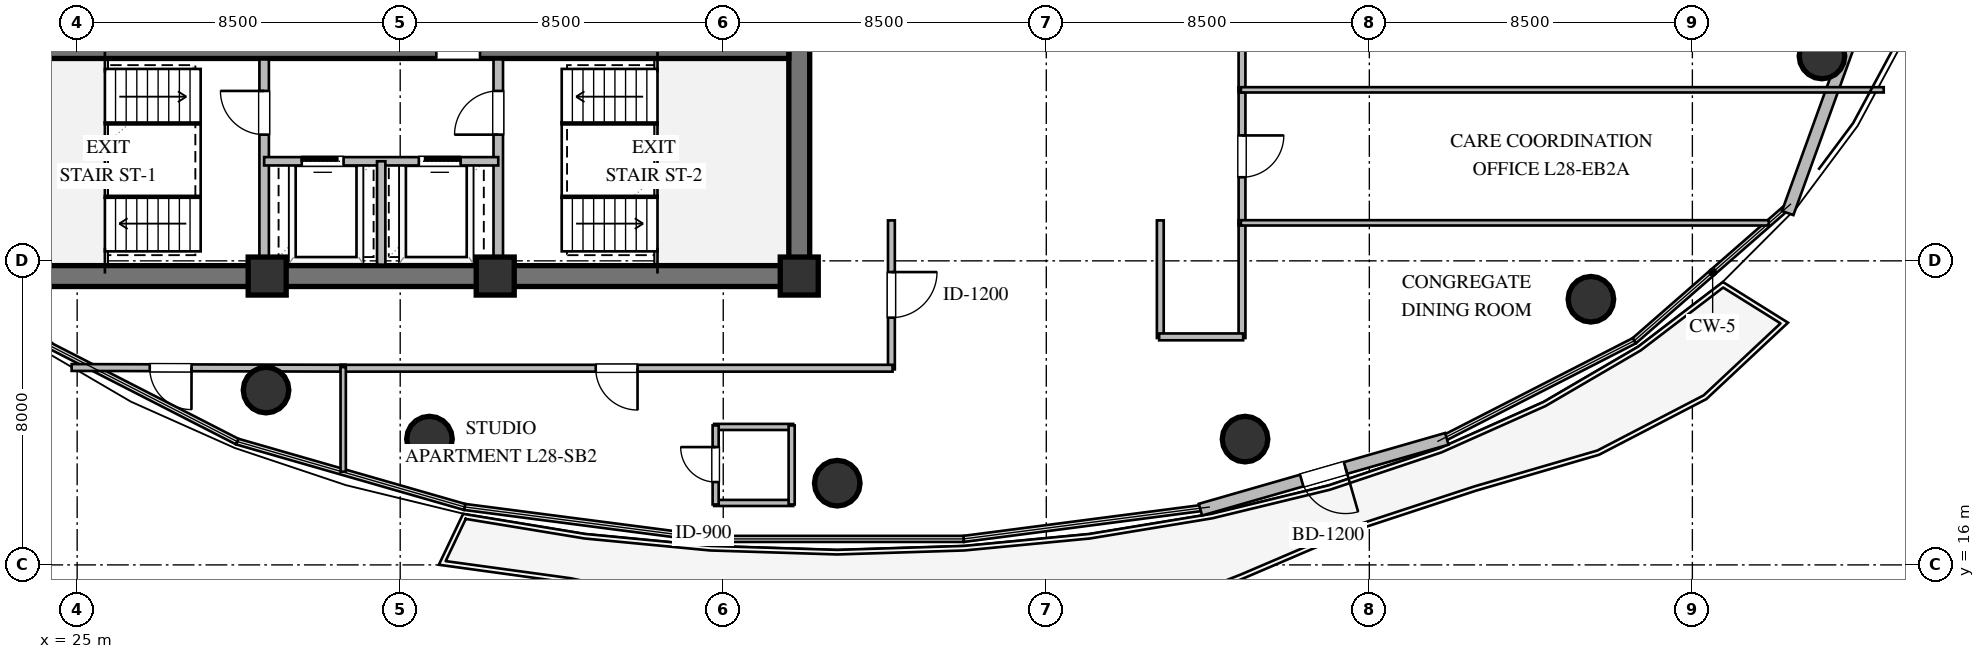
"""IFC4 building model, lengths in metres.
Left out: names, types, materials, properties, quantities, classifications, styles, units other than length and angle.
Written with IfcOpenShell. Run it as: python <this file> out.ifc"""

import sys

from ifc_helpers import new_model, si_unit, direction, frame, frame_2d, origin, origin_2d, place, context, subcontext, project, spatial, rectangle, circle, extrude, element, fill, save


model = new_model("IFC4")
c1 = context("Model", 3, precision=1e-05, world=origin(), true_north=direction((0.0, 1.0)))
c2 = subcontext(c1, "Body", "Model", "MODEL_VIEW")
j1 = project(units=[si_unit("LENGTHUNIT", "METRE"), si_unit("PLANEANGLEUNIT", "RADIAN")], contexts=[c1])
p1 = place(None, origin())
s1 = spatial("IfcSite", under=j1, at=p1, CompositionType="ELEMENT")
p2 = place(p1, origin())
s2 = spatial("IfcBuilding", under=s1, at=p2, CompositionType="ELEMENT")
p3 = place(p2, frame((0.0, 0.0, 109.8)))
s3 = spatial("IfcBuildingStorey", under=s2, at=p3, CompositionType="ELEMENT", Elevation=109.8)
p4 = place(p3, frame((21.725, 23.6, 0.0), z_axis=(0.0, 0.0, 1.0), x_axis=(1.0, 0.0, 0.0)))
e1 = element("IfcWall", 1, at=p4, inside=s3, PredefinedType="SHEAR", context=c2, shape_type="SweptSolid", body=[
    extrude(rectangle(XDim=22.55, YDim=0.55, at=frame_2d((11.275, 0.0))), origin(), (0.0, 0.0, 1.0), 3.36),
])
p5 = place(p3, frame((44.0, 23.875, 0.0), z_axis=(0.0, 0.0, 1.0), x_axis=(0.0, 1.0, 0.0)))
e2 = element("IfcWall", 2, at=p5, inside=s3, PredefinedType="SHEAR", context=c2, shape_type="SweptSolid", body=[
    extrude(rectangle(XDim=12.25, YDim=0.55, at=frame_2d((6.125, 0.0))), origin(), (0.0, 0.0, 1.0), 3.36),
])
p6 = place(p5, frame((8.725, 0.0, 0.0)))
e3 = element("IfcOpeningElement", 3, at=p6, cuts=e2, PredefinedType="OPENING", context=c2, shape_type="SweptSolid", body=[
    extrude(rectangle(XDim=1.5, YDim=2.15, at=frame_2d((0.75, 1.075))), frame((0.0, 0.285, 0.0), z_axis=(0.0, -1.0, 0.0), x_axis=(1.0, 0.0, 0.0)), (0.0, 0.0, 1.0), 0.57),
])
p7 = place(p3, frame((22.275, 29.6, 0.0), z_axis=(0.0, 0.0, 1.0), x_axis=(1.0, 0.0, 0.0)))
e4 = element("IfcWall", 4, at=p7, inside=s3, PredefinedType="SHEAR", context=c2, shape_type="SweptSolid", body=[
    extrude(rectangle(XDim=21.45, YDim=0.55, at=frame_2d((10.725, 0.0))), origin(), (0.0, 0.0, 1.0), 3.36),
])
p8 = place(p7, frame((12.175, 0.0, 0.0)))
e5 = element("IfcOpeningElement", 5, at=p8, cuts=e4, PredefinedType="OPENING", context=c2, shape_type="SweptSolid", body=[
    extrude(rectangle(XDim=1.15, YDim=2.1, at=frame_2d((0.575, 1.05))), frame((0.0, 0.285, 0.0), z_axis=(0.0, -1.0, 0.0), x_axis=(1.0, 0.0, 0.0)), (0.0, 0.0, 1.0), 0.57),
])
for number, where, z_axis, x_axis in (
    (6, (30.0, 23.6, 0.0), (0.0, 0.0, 1.0), (1.0, 0.0, 0.0)),
    (7, (36.0, 23.6, 0.0), (0.0, 0.0, 1.0), (1.0, 0.0, 0.0)),
    (8, (44.0, 23.6, 0.0), (0.0, 0.0, 1.0), (1.0, 0.0, 0.0)),
):
    element("IfcColumn", number, at=place(p3, frame(where, z_axis=z_axis, x_axis=x_axis)), inside=s3, PredefinedType="COLUMN", context=c2, shape_type="SweptSolid", body=[
        extrude(rectangle(XDim=1.0, YDim=1.0, at=origin_2d()), origin(), (0.0, 0.0, 1.0), 3.6),
    ])
for number, where, z_axis, x_axis in (
    (9, (29.97, 20.6, 0.0), (0.0, 0.0, 1.0), (1.0, 0.0, 0.0)),
    (10, (34.27, 19.31, 0.0), (0.0, 0.0, 1.0), (1.0, 0.0, 0.0)),
    (11, (45.0, 18.15, 0.0), (0.0, 0.0, 1.0), (1.0, 0.0, 0.0)),
    (12, (55.73, 19.31, 0.0), (0.0, 0.0, 1.0), (1.0, 0.0, 0.0)),
    (13, (64.83, 22.99, 0.0), (0.0, 0.0, 1.0), (1.0, 0.0, 0.0)),
    (14, (70.91, 29.39, 0.0), (0.0, 0.0, 1.0), (1.0, 0.0, 0.0)),
):
    element("IfcColumn", number, at=place(p3, frame(where, z_axis=z_axis, x_axis=x_axis)), inside=s3, PredefinedType="COLUMN", context=c2, shape_type="SweptSolid", body=[
        extrude(circle(Radius=0.6, at=origin_2d()), origin(), (0.0, 0.0, 1.0), 3.6),
    ])
p9 = place(p3, frame((74.708, 38.244, 0.0), z_axis=(0.0, 0.0, 1.0), x_axis=(-0.340324669139, -0.94030799187, 0.0)))
e15 = element("IfcWall", 15, at=p9, inside=s3, PredefinedType="STANDARD", context=c2, shape_type="SweptSolid", body=[
    extrude(rectangle(XDim=13.81, YDim=0.32, at=frame_2d((6.905, 0.0))), origin(), (0.0, 0.0, 1.0), 3.36),
])
p10 = place(p3, frame((61.039, 19.317, 0.0), z_axis=(0.0, 0.0, 1.0), x_axis=(-0.96106509915, -0.276322049784, 0.0)))
e16 = element("IfcWall", 16, at=p10, inside=s3, PredefinedType="STANDARD", context=c2, shape_type="SweptSolid", body=[
    extrude(rectangle(XDim=6.746, YDim=0.32, at=frame_2d((3.373, 0.0))), origin(), (0.0, 0.0, 1.0), 3.36),
])
p11 = place(p10, frame((2.773, 0.0, 0.0)))
e17 = element("IfcOpeningElement", 17, at=p11, cuts=e16, PredefinedType="OPENING", context=c2, shape_type="SweptSolid", body=[
    extrude(rectangle(XDim=1.2, YDim=2.15, at=frame_2d((0.6, 1.075))), frame((0.0, 0.17, 0.0), z_axis=(0.0, -1.0, 0.0), x_axis=(1.0, 0.0, 0.0)), (0.0, 0.0, 1.0), 0.34),
])
p12 = place(p3, frame((29.92, 23.9, 0.0), z_axis=(0.0, 0.0, 1.0), x_axis=(0.0, 1.0, 0.0)))
e18 = element("IfcWall", 18, at=p12, inside=s3, PredefinedType="SOLIDWALL", context=c2, shape_type="SweptSolid", body=[
    extrude(rectangle(XDim=5.4, YDim=0.25, at=frame_2d((2.7, 0.0))), origin(), (0.0, 0.0, 1.0), 2.806),
])
p13 = place(p12, frame((3.421, 0.0, 0.0)))
e19 = element("IfcOpeningElement", 19, at=p13, cuts=e18, PredefinedType="OPENING", context=c2, shape_type="SweptSolid", body=[
    extrude(rectangle(XDim=1.15, YDim=2.1, at=frame_2d((0.575, 1.05))), frame((0.0, 0.135, 0.0), z_axis=(0.0, -1.0, 0.0), x_axis=(1.0, 0.0, 0.0)), (0.0, 0.0, 1.0), 0.27),
])
p14 = place(p3, frame((36.08, 23.9, 0.0), z_axis=(0.0, 0.0, 1.0), x_axis=(0.0, 1.0, 0.0)))
e20 = element("IfcWall", 20, at=p14, inside=s3, PredefinedType="SOLIDWALL", context=c2, shape_type="SweptSolid", body=[
    extrude(rectangle(XDim=5.4, YDim=0.25, at=frame_2d((2.7, 0.0))), origin(), (0.0, 0.0, 1.0), 3.36),
])
p15 = place(p14, frame((3.421, 0.0, 0.0)))
e21 = element("IfcOpeningElement", 21, at=p15, cuts=e20, PredefinedType="OPENING", context=c2, shape_type="SweptSolid", body=[
    extrude(rectangle(XDim=1.15, YDim=2.1, at=frame_2d((0.575, 1.05))), frame((0.0, 0.135, 0.0), z_axis=(0.0, -1.0, 0.0), x_axis=(1.0, 0.0, 0.0)), (0.0, 0.0, 1.0), 0.27),
])
p16 = place(p3, frame((29.92, 26.62, 0.0), z_axis=(0.0, 0.0, 1.0), x_axis=(1.0, 0.0, 0.0)))
e22 = element("IfcWall", 22, at=p16, inside=s3, PredefinedType="SOLIDWALL", context=c2, shape_type="SweptSolid", body=[
    extrude(rectangle(XDim=6.16, YDim=0.22, at=frame_2d((3.08, 0.0))), origin(), (0.0, 0.0, 1.0), 3.36),
])
p17 = place(p16, frame((0.99, 0.0, 0.0)))
e23 = element("IfcOpeningElement", 23, at=p17, cuts=e22, PredefinedType="OPENING", context=c2, shape_type="SweptSolid", body=[
    extrude(rectangle(XDim=1.1, YDim=2.1, at=frame_2d((0.55, 1.05))), frame((0.0, 0.12, 0.0), z_axis=(0.0, -1.0, 0.0), x_axis=(1.0, 0.0, 0.0)), (0.0, 0.0, 1.0), 0.24),
])
p18 = place(p16, frame((4.07, 0.0, 0.0)))
e24 = element("IfcOpeningElement", 24, at=p18, cuts=e22, PredefinedType="OPENING", context=c2, shape_type="SweptSolid", body=[
    extrude(rectangle(XDim=1.1, YDim=2.1, at=frame_2d((0.55, 1.05))), frame((0.0, 0.12, 0.0), z_axis=(0.0, -1.0, 0.0), x_axis=(1.0, 0.0, 0.0)), (0.0, 0.0, 1.0), 0.24),
])
p19 = place(p3, frame((33.0, 23.9, 0.0), z_axis=(0.0, 0.0, 1.0), x_axis=(0.0, 1.0, 0.0)))
e25 = element("IfcWall", 25, at=p19, inside=s3, PredefinedType="SOLIDWALL", context=c2, shape_type="SweptSolid", body=[
    extrude(rectangle(XDim=2.72, YDim=0.22, at=frame_2d((1.36, 0.0))), origin(), (0.0, 0.0, 1.0), 3.36),
])
p20 = place(p3, frame((41.76, 17.63, 0.0), z_axis=(0.0, 0.0, 1.0), x_axis=(1.0, 0.0, 0.0)))
e26 = element("IfcWall", 26, at=p20, inside=s3, PredefinedType="PLUMBINGWALL", context=c2, shape_type="SweptSolid", body=[
    extrude(rectangle(XDim=2.08, YDim=0.16, at=frame_2d((1.04, 0.0))), origin(), (0.0, 0.0, 1.0), 2.657),
])
p21 = place(p3, frame((41.76, 19.63, 0.0), z_axis=(0.0, 0.0, 1.0), x_axis=(1.0, 0.0, 0.0)))
e27 = element("IfcWall", 27, at=p21, inside=s3, PredefinedType="PLUMBINGWALL", context=c2, shape_type="SweptSolid", body=[
    extrude(rectangle(XDim=2.08, YDim=0.16, at=frame_2d((1.04, 0.0))), origin(), (0.0, 0.0, 1.0), 3.36),
])
p22 = place(p3, frame((41.8, 17.59, 0.0), z_axis=(0.0, 0.0, 1.0), x_axis=(0.0, 1.0, 0.0)))
e28 = element("IfcWall", 28, at=p22, inside=s3, PredefinedType="PLUMBINGWALL", context=c2, shape_type="SweptSolid", body=[
    extrude(rectangle(XDim=2.08, YDim=0.16, at=frame_2d((1.04, 0.0))), origin(), (0.0, 0.0, 1.0), 3.36),
])
p23 = place(p22, frame((0.59, 0.0, 0.0)))
e29 = element("IfcOpeningElement", 29, at=p23, cuts=e28, PredefinedType="OPENING", context=c2, shape_type="SweptSolid", body=[
    extrude(rectangle(XDim=0.92, YDim=2.1, at=frame_2d((0.46, 1.05))), frame((0.0, 0.09, 0.0), z_axis=(0.0, -1.0, 0.0), x_axis=(1.0, 0.0, 0.0)), (0.0, 0.0, 1.0), 0.18),
])
p24 = place(p3, frame((43.8, 17.59, 0.0), z_axis=(0.0, 0.0, 1.0), x_axis=(0.0, 1.0, 0.0)))
e30 = element("IfcWall", 30, at=p24, inside=s3, PredefinedType="PLUMBINGWALL", context=c2, shape_type="SweptSolid", body=[
    extrude(rectangle(XDim=2.08, YDim=0.16, at=frame_2d((1.04, 0.0))), origin(), (0.0, 0.0, 1.0), 3.36),
])
p25 = place(p3, frame((46.425, 25.065, 0.0), z_axis=(0.0, 0.0, 1.0), x_axis=(0.0, -1.0, 0.0)))
e31 = element("IfcWall", 31, at=p25, inside=s3, PredefinedType="PARTITIONING", context=c2, shape_type="SweptSolid", body=[
    extrude(rectangle(XDim=3.92, YDim=0.18, at=frame_2d((1.96, 0.0))), origin(), (0.0, 0.0, 1.0), 3.36),
])
p26 = place(p25, frame((1.36, 0.0, 0.0)))
e32 = element("IfcOpeningElement", 32, at=p26, cuts=e31, PredefinedType="OPENING", context=c2, shape_type="SweptSolid", body=[
    extrude(rectangle(XDim=1.2, YDim=2.15, at=frame_2d((0.6, 1.075))), frame((0.0, 0.1, 0.0), z_axis=(0.0, -1.0, 0.0), x_axis=(1.0, 0.0, 0.0)), (0.0, 0.0, 1.0), 0.2),
])
for number, where, z_axis, x_axis in (
    (33, (55.65, 25.065, 0.0), (0.0, 0.0, 1.0), (0.0, -1.0, 0.0)),
    (34, (53.5, 21.97, 0.0), (0.0, 0.0, 1.0), (0.0, 1.0, 0.0)),
):
    element("IfcWall", number, at=place(p3, frame(where, z_axis=z_axis, x_axis=x_axis)), inside=s3, PredefinedType="PARTITIONING", context=c2, shape_type="SweptSolid", body=[
        extrude(rectangle(XDim=3.095, YDim=0.18, at=frame_2d((1.547, 0.0))), origin(), (0.0, 0.0, 1.0), 3.36),
    ])
p27 = place(p3, frame((55.68, 22.0, 0.0), z_axis=(0.0, 0.0, 1.0), x_axis=(-1.0, 0.0, 0.0)))
e35 = element("IfcWall", 35, at=p27, inside=s3, PredefinedType="PARTITIONING", context=c2, shape_type="SweptSolid", body=[
    extrude(rectangle(XDim=2.21, YDim=0.18, at=frame_2d((1.105, 0.0))), origin(), (0.0, 0.0, 1.0), 3.36),
])
p28 = place(p3, frame((55.65, 28.565, 0.0), z_axis=(0.0, 0.0, 1.0), x_axis=(0.0, -1.0, 0.0)))
e36 = element("IfcWall", 36, at=p28, inside=s3, PredefinedType="PARTITIONING", context=c2, shape_type="SweptSolid", body=[
    extrude(rectangle(XDim=3.63, YDim=0.18, at=frame_2d((1.815, 0.0))), origin(), (0.0, 0.0, 1.0), 3.36),
])
p29 = place(p28, frame((1.265, 0.0, 0.0)))
e37 = element("IfcOpeningElement", 37, at=p29, cuts=e36, PredefinedType="OPENING", context=c2, shape_type="SweptSolid", body=[
    extrude(rectangle(XDim=1.1, YDim=2.1, at=frame_2d((0.55, 1.05))), frame((0.0, 0.1, 0.0), z_axis=(0.0, -1.0, 0.0), x_axis=(1.0, 0.0, 0.0)), (0.0, 0.0, 1.0), 0.2),
])
p30 = place(p3, frame((55.65, 32.065, 0.0), z_axis=(0.0, 0.0, 1.0), x_axis=(0.0, -1.0, 0.0)))
e38 = element("IfcWall", 38, at=p30, inside=s3, PredefinedType="PARTITIONING", context=c2, shape_type="SweptSolid", body=[
    extrude(rectangle(XDim=3.63, YDim=0.18, at=frame_2d((1.815, 0.0))), origin(), (0.0, 0.0, 1.0), 3.36),
])
p31 = place(p30, frame((1.265, 0.0, 0.0)))
e39 = element("IfcOpeningElement", 39, at=p31, cuts=e38, PredefinedType="OPENING", context=c2, shape_type="SweptSolid", body=[
    extrude(rectangle(XDim=1.1, YDim=2.1, at=frame_2d((0.55, 1.05))), frame((0.0, 0.1, 0.0), z_axis=(0.0, -1.0, 0.0), x_axis=(1.0, 0.0, 0.0)), (0.0, 0.0, 1.0), 0.2),
])
p32 = place(p3, frame((32.065, 21.175, 0.0), z_axis=(0.0, 0.0, 1.0), x_axis=(-0.999996512042, 0.002641193551, 0.0)))
e40 = element("IfcWall", 40, at=p32, inside=s3, PredefinedType="PARTITIONING", context=c2, shape_type="SweptSolid", body=[
    extrude(rectangle(XDim=7.21, YDim=0.18, at=frame_2d((3.605, 0.0))), origin(), (0.0, 0.0, 1.0), 2.657),
])
p33 = place(p32, frame((4.055, 0.0, 0.0)))
e41 = element("IfcOpeningElement", 41, at=p33, cuts=e40, PredefinedType="OPENING", context=c2, shape_type="SweptSolid", body=[
    extrude(rectangle(XDim=1.1, YDim=2.1, at=frame_2d((0.55, 1.05))), frame((0.0, 0.1, 0.0), z_axis=(0.0, -1.0, 0.0), x_axis=(1.0, 0.0, 0.0)), (0.0, 0.0, 1.0), 0.2),
])
p34 = place(p3, frame((46.455, 21.175, 0.0), z_axis=(0.0, 0.0, 1.0), x_axis=(-1.0, 0.0, 0.0)))
e42 = element("IfcWall", 42, at=p34, inside=s3, PredefinedType="PARTITIONING", context=c2, shape_type="SweptSolid", body=[
    extrude(rectangle(XDim=14.52, YDim=0.18, at=frame_2d((7.26, 0.0))), origin(), (0.0, 0.0, 1.0), 2.996),
])
p35 = place(p34, frame((6.71, 0.0, 0.0)))
e43 = element("IfcOpeningElement", 43, at=p35, cuts=e42, PredefinedType="OPENING", context=c2, shape_type="SweptSolid", body=[
    extrude(rectangle(XDim=1.1, YDim=2.1, at=frame_2d((0.55, 1.05))), frame((0.0, 0.1, 0.0), z_axis=(0.0, -1.0, 0.0), x_axis=(1.0, 0.0, 0.0)), (0.0, 0.0, 1.0), 0.2),
])
p36 = place(p3, frame((55.62, 25.0, 0.0), z_axis=(0.0, 0.0, 1.0), x_axis=(1.0, 0.0, 0.0)))
e44 = element("IfcWall", 44, at=p36, inside=s3, PredefinedType="PARTITIONING", context=c2, shape_type="SweptSolid", body=[
    extrude(rectangle(XDim=13.891, YDim=0.14, at=frame_2d((6.946, 0.0))), origin(), (0.0, 0.0, 1.0), 3.36),
])
p37 = place(p3, frame((55.62, 28.5, 0.0), z_axis=(0.0, 0.0, 1.0), x_axis=(1.0, 0.0, 0.0)))
e45 = element("IfcWall", 45, at=p37, inside=s3, PredefinedType="PARTITIONING", context=c2, shape_type="SweptSolid", body=[
    extrude(rectangle(XDim=16.915, YDim=0.14, at=frame_2d((8.458, 0.0))), origin(), (0.0, 0.0, 1.0), 2.806),
])
p38 = place(p3, frame((32.0, 21.205, 0.0), z_axis=(0.0, 0.0, 1.0), x_axis=(0.0, -1.0, 0.0)))
e46 = element("IfcWall", 46, at=p38, inside=s3, PredefinedType="PARTITIONING", context=c2, shape_type="SweptSolid", body=[
    extrude(rectangle(XDim=2.752, YDim=0.14, at=frame_2d((1.376, 0.0))), origin(), (0.0, 0.0, 1.0), 3.36),
])
p39 = place(p11, origin())
e47 = element("IfcDoor", 47, at=p39, inside=s3, OperationType="SINGLE_SWING_LEFT", PredefinedType="DOOR", context=c2, shape_type="SweptSolid", body=[
    extrude(rectangle(XDim=1.2, YDim=2.15, at=frame_2d((0.6, 1.075))), frame((0.0, 0.025, 0.0), z_axis=(0.0, -1.0, 0.0), x_axis=(1.0, 0.0, 0.0)), (0.0, 0.0, 1.0), 0.05),
])
fill(e17, e47)
p40 = place(p13, origin())
e48 = element("IfcDoor", 48, at=p40, inside=s3, OperationType="SINGLE_SWING_RIGHT", PredefinedType="DOOR", context=c2, shape_type="SweptSolid", body=[
    extrude(rectangle(XDim=1.15, YDim=2.1, at=frame_2d((0.575, 1.05))), frame((0.0, 0.025, 0.0), z_axis=(0.0, -1.0, 0.0), x_axis=(1.0, 0.0, 0.0)), (0.0, 0.0, 1.0), 0.05),
])
fill(e19, e48)
p41 = place(p15, origin())
e49 = element("IfcDoor", 49, at=p41, inside=s3, OperationType="SINGLE_SWING_LEFT", PredefinedType="DOOR", context=c2, shape_type="SweptSolid", body=[
    extrude(rectangle(XDim=1.15, YDim=2.1, at=frame_2d((0.575, 1.05))), frame((0.0, 0.025, 0.0), z_axis=(0.0, -1.0, 0.0), x_axis=(1.0, 0.0, 0.0)), (0.0, 0.0, 1.0), 0.05),
])
fill(e21, e49)
p42 = place(p17, origin())
e50 = element("IfcDoor", 50, at=p42, inside=s3, OperationType="SLIDING_TO_LEFT", PredefinedType="DOOR", context=c2, shape_type="SweptSolid", body=[
    extrude(rectangle(XDim=1.1, YDim=2.1, at=frame_2d((0.55, 1.05))), frame((0.0, 0.025, 0.0), z_axis=(0.0, -1.0, 0.0), x_axis=(1.0, 0.0, 0.0)), (0.0, 0.0, 1.0), 0.05),
])
fill(e23, e50)
p43 = place(p18, origin())
e51 = element("IfcDoor", 51, at=p43, inside=s3, OperationType="SLIDING_TO_RIGHT", PredefinedType="DOOR", context=c2, shape_type="SweptSolid", body=[
    extrude(rectangle(XDim=1.1, YDim=2.1, at=frame_2d((0.55, 1.05))), frame((0.0, 0.025, 0.0), z_axis=(0.0, -1.0, 0.0), x_axis=(1.0, 0.0, 0.0)), (0.0, 0.0, 1.0), 0.05),
])
fill(e24, e51)
p44 = place(p23, origin())
e52 = element("IfcDoor", 52, at=p44, inside=s3, OperationType="SINGLE_SWING_RIGHT", PredefinedType="DOOR", context=c2, shape_type="SweptSolid", body=[
    extrude(rectangle(XDim=0.92, YDim=2.1, at=frame_2d((0.46, 1.05))), frame((0.0, 0.025, 0.0), z_axis=(0.0, -1.0, 0.0), x_axis=(1.0, 0.0, 0.0)), (0.0, 0.0, 1.0), 0.05),
])
fill(e29, e52)
p45 = place(p26, origin())
e53 = element("IfcDoor", 53, at=p45, inside=s3, OperationType="SINGLE_SWING_LEFT", PredefinedType="DOOR", context=c2, shape_type="SweptSolid", body=[
    extrude(rectangle(XDim=1.2, YDim=2.15, at=frame_2d((0.6, 1.075))), frame((0.0, 0.025, 0.0), z_axis=(0.0, -1.0, 0.0), x_axis=(1.0, 0.0, 0.0)), (0.0, 0.0, 1.0), 0.05),
])
fill(e32, e53)
p46 = place(p29, origin())
e54 = element("IfcDoor", 54, at=p46, inside=s3, OperationType="SINGLE_SWING_LEFT", PredefinedType="DOOR", context=c2, shape_type="SweptSolid", body=[
    extrude(rectangle(XDim=1.1, YDim=2.1, at=frame_2d((0.55, 1.05))), frame((0.0, 0.025, 0.0), z_axis=(0.0, -1.0, 0.0), x_axis=(1.0, 0.0, 0.0)), (0.0, 0.0, 1.0), 0.05),
])
fill(e37, e54)
p47 = place(p33, origin())
e55 = element("IfcDoor", 55, at=p47, inside=s3, OperationType="SINGLE_SWING_LEFT", PredefinedType="DOOR", context=c2, shape_type="SweptSolid", body=[
    extrude(rectangle(XDim=1.1, YDim=2.1, at=frame_2d((0.55, 1.05))), frame((0.0, 0.025, 0.0), z_axis=(0.0, -1.0, 0.0), x_axis=(1.0, 0.0, 0.0)), (0.0, 0.0, 1.0), 0.05),
])
fill(e41, e55)
p48 = place(p35, origin())
e56 = element("IfcDoor", 56, at=p48, inside=s3, OperationType="SINGLE_SWING_LEFT", PredefinedType="DOOR", context=c2, shape_type="SweptSolid", body=[
    extrude(rectangle(XDim=1.1, YDim=2.1, at=frame_2d((0.55, 1.05))), frame((0.0, 0.025, 0.0), z_axis=(0.0, -1.0, 0.0), x_axis=(1.0, 0.0, 0.0)), (0.0, 0.0, 1.0), 0.05),
])
fill(e43, e56)
save(model, sys.argv[1])
